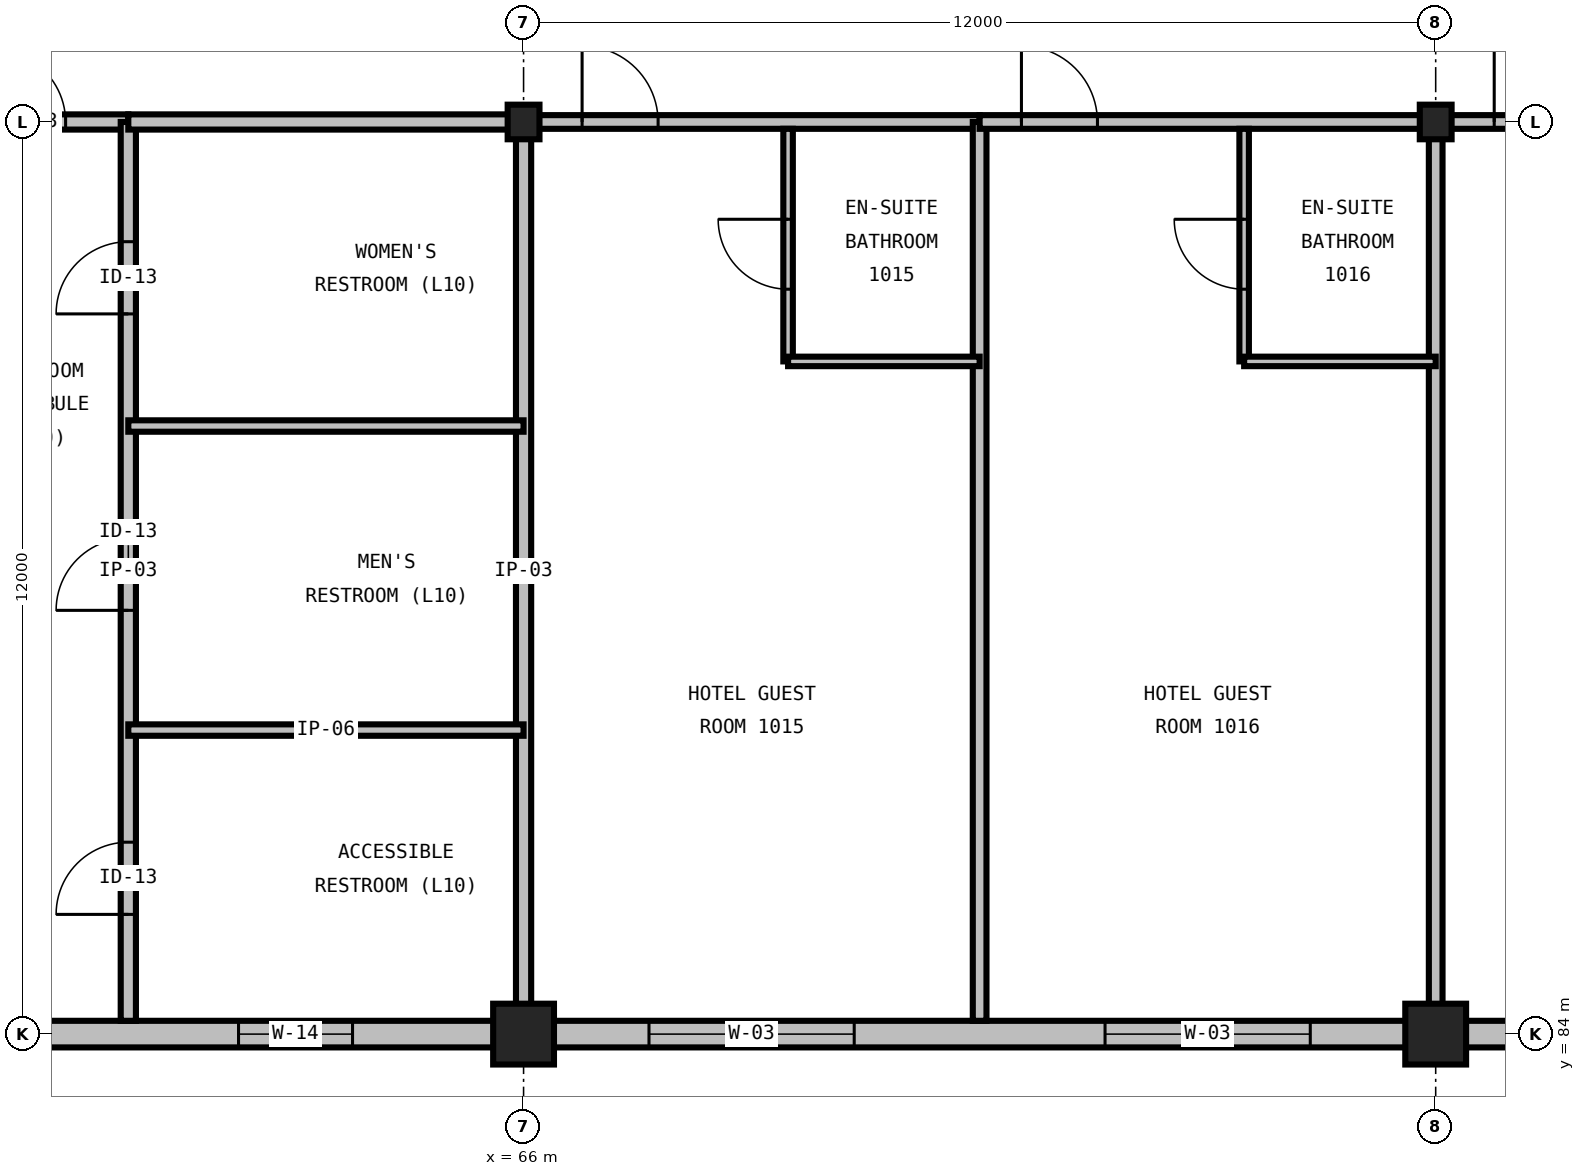
"""IFC4 building model, lengths in metres.
Left out: names, types, materials, properties, quantities, classifications, styles, units other than length and angle.
Written with IfcOpenShell. Run it as: python <this file> out.ifc"""

import sys

from ifc_helpers import new_model, si_unit, direction, frame, frame_2d, origin, origin_2d, place, context, subcontext, project, spatial, rectangle, i_section, extrude, element, fill, save


model = new_model("IFC4")
c1 = context("Model", 3, precision=1e-05, world=origin(), true_north=direction((0.0, 1.0)))
c2 = subcontext(c1, "Body", "Model", "MODEL_VIEW")
j1 = project(units=[si_unit("LENGTHUNIT", "METRE"), si_unit("PLANEANGLEUNIT", "RADIAN")], contexts=[c1])
p1 = place(None, origin())
s1 = spatial("IfcSite", under=j1, at=p1, CompositionType="ELEMENT")
p2 = place(p1, origin())
s2 = spatial("IfcBuilding", under=s1, at=p2, CompositionType="ELEMENT")
p3 = place(p2, frame((0.0, 0.0, 45.6)))
s3 = spatial("IfcBuildingStorey", under=s2, at=p3, CompositionType="ELEMENT", Elevation=45.6)
p4 = place(p3, frame((66.0, 84.0, 0.0), z_axis=(0.0, 0.0, 1.0), x_axis=(1.0, 0.0, 0.0)))
e1 = element("IfcColumn", 1, at=p4, inside=s3, PredefinedType="COLUMN", context=c2, shape_type="SweptSolid", body=[
    extrude(rectangle(XDim=0.8, YDim=0.8, at=origin_2d()), origin(), (0.0, 0.0, 1.0), 3.6),
])
p5 = place(p3, frame((66.0, 96.0, 0.0), z_axis=(0.0, 0.0, 1.0), x_axis=(1.0, 0.0, 0.0)))
e2 = element("IfcColumn", 2, at=p5, inside=s3, PredefinedType="COLUMN", context=c2, shape_type="SweptSolid", body=[
    extrude(i_section(OverallWidth=0.419, OverallDepth=0.455, WebThickness=0.042, FlangeThickness=0.068, FilletRadius=0.031, at=origin_2d()), origin(), (0.0, 0.0, 1.0), 3.6),
])
p6 = place(p3, frame((78.0, 84.0, 0.0), z_axis=(0.0, 0.0, 1.0), x_axis=(1.0, 0.0, 0.0)))
e3 = element("IfcColumn", 3, at=p6, inside=s3, PredefinedType="COLUMN", context=c2, shape_type="SweptSolid", body=[
    extrude(rectangle(XDim=0.8, YDim=0.8, at=origin_2d()), origin(), (0.0, 0.0, 1.0), 3.6),
])
p7 = place(p3, frame((78.0, 96.0, 0.0), z_axis=(0.0, 0.0, 1.0), x_axis=(1.0, 0.0, 0.0)))
e4 = element("IfcColumn", 4, at=p7, inside=s3, PredefinedType="COLUMN", context=c2, shape_type="SweptSolid", body=[
    extrude(i_section(OverallWidth=0.419, OverallDepth=0.455, WebThickness=0.042, FlangeThickness=0.068, FilletRadius=0.031, at=origin_2d()), origin(), (0.0, 0.0, 1.0), 3.6),
])
p8 = place(p3, frame((54.0, 84.0, 0.0), z_axis=(0.0, 0.0, 1.0), x_axis=(1.0, 0.0, 0.0)))
e5 = element("IfcWall", 5, at=p8, inside=s3, PredefinedType="STANDARD", context=c2, shape_type="SweptSolid", body=[
    extrude(rectangle(XDim=12.0, YDim=0.35, at=frame_2d((6.0, 0.0))), origin(), (0.0, 0.0, 1.0), 2.486),
])
p9 = place(p8, frame((2.3, 0.0, 1.0)))
e6 = element("IfcOpeningElement", 6, at=p9, cuts=e5, PredefinedType="OPENING", context=c2, shape_type="SweptSolid", body=[
    extrude(rectangle(XDim=1.4, YDim=1.4, at=frame_2d((0.7, 0.7))), frame((0.0, 0.19, 0.0), z_axis=(0.0, -1.0, 0.0), x_axis=(1.0, 0.0, 0.0)), (0.0, 0.0, 1.0), 0.38),
])
p10 = place(p8, frame((8.25, 0.0, 1.0)))
e7 = element("IfcOpeningElement", 7, at=p10, cuts=e5, PredefinedType="OPENING", context=c2, shape_type="SweptSolid", body=[
    extrude(rectangle(XDim=1.5, YDim=1.35, at=frame_2d((0.75, 0.675))), frame((0.0, 0.19, 0.0), z_axis=(0.0, -1.0, 0.0), x_axis=(1.0, 0.0, 0.0)), (0.0, 0.0, 1.0), 0.38),
])
p11 = place(p3, frame((66.0, 84.0, 0.0), z_axis=(0.0, 0.0, 1.0), x_axis=(1.0, 0.0, 0.0)))
e8 = element("IfcWall", 8, at=p11, inside=s3, PredefinedType="STANDARD", context=c2, shape_type="SweptSolid", body=[
    extrude(rectangle(XDim=12.0, YDim=0.35, at=frame_2d((6.0, 0.0))), origin(), (0.0, 0.0, 1.0), 2.486),
])
p12 = place(p11, frame((1.65, 0.0, 0.72)))
e9 = element("IfcOpeningElement", 9, at=p12, cuts=e8, PredefinedType="OPENING", context=c2, shape_type="SweptSolid", body=[
    extrude(rectangle(XDim=2.7, YDim=1.65, at=frame_2d((1.35, 0.825))), frame((0.0, 0.19, 0.0), z_axis=(0.0, -1.0, 0.0), x_axis=(1.0, 0.0, 0.0)), (0.0, 0.0, 1.0), 0.38),
])
p13 = place(p11, frame((7.65, 0.0, 0.72)))
e10 = element("IfcOpeningElement", 10, at=p13, cuts=e8, PredefinedType="OPENING", context=c2, shape_type="SweptSolid", body=[
    extrude(rectangle(XDim=2.7, YDim=1.65, at=frame_2d((1.35, 0.825))), frame((0.0, 0.19, 0.0), z_axis=(0.0, -1.0, 0.0), x_axis=(1.0, 0.0, 0.0)), (0.0, 0.0, 1.0), 0.38),
])
p14 = place(p3, frame((78.0, 84.0, 0.0), z_axis=(0.0, 0.0, 1.0), x_axis=(1.0, 0.0, 0.0)))
e11 = element("IfcWall", 11, at=p14, inside=s3, PredefinedType="STANDARD", context=c2, shape_type="SweptSolid", body=[
    extrude(rectangle(XDim=6.0, YDim=0.35, at=frame_2d((3.0, 0.0))), origin(), (0.0, 0.0, 1.0), 2.486),
])
p15 = place(p14, frame((1.65, 0.0, 0.72)))
e12 = element("IfcOpeningElement", 12, at=p15, cuts=e11, PredefinedType="OPENING", context=c2, shape_type="SweptSolid", body=[
    extrude(rectangle(XDim=2.7, YDim=1.65, at=frame_2d((1.35, 0.825))), frame((0.0, 0.19, 0.0), z_axis=(0.0, -1.0, 0.0), x_axis=(1.0, 0.0, 0.0)), (0.0, 0.0, 1.0), 0.38),
])
p16 = place(p3, frame((58.4, 96.0, 0.0), z_axis=(0.0, 0.0, 1.0), x_axis=(1.0, 0.0, 0.0)))
e13 = element("IfcWall", 13, at=p16, inside=s3, PredefinedType="PARTITIONING", context=c2, shape_type="SweptSolid", body=[
    extrude(rectangle(XDim=2.4, YDim=0.2, at=frame_2d((1.2, 0.0))), origin(), (0.0, 0.0, 1.0), 2.359),
])
p17 = place(p16, frame((0.625, 0.0, 0.0)))
e14 = element("IfcOpeningElement", 14, at=p17, cuts=e13, PredefinedType="OPENING", context=c2, shape_type="SweptSolid", body=[
    extrude(rectangle(XDim=0.95, YDim=2.15, at=frame_2d((0.475, 1.075))), frame((0.0, 0.115, 0.0), z_axis=(0.0, -1.0, 0.0), x_axis=(1.0, 0.0, 0.0)), (0.0, 0.0, 1.0), 0.23),
])
p18 = place(p3, frame((60.8, 84.175, 0.0), z_axis=(0.0, 0.0, 1.0), x_axis=(0.0, 1.0, 0.0)))
e15 = element("IfcWall", 15, at=p18, inside=s3, PredefinedType="PARTITIONING", context=c2, shape_type="SweptSolid", body=[
    extrude(rectangle(XDim=11.825, YDim=0.2, at=frame_2d((5.913, 0.0))), origin(), (0.0, 0.0, 1.0), 3.29),
])
p19 = place(p18, frame((1.4, 0.0, 0.0)))
e16 = element("IfcOpeningElement", 16, at=p19, cuts=e15, PredefinedType="OPENING", context=c2, shape_type="SweptSolid", body=[
    extrude(rectangle(XDim=0.95, YDim=2.15, at=frame_2d((0.475, 1.075))), frame((0.0, 0.115, 0.0), z_axis=(0.0, -1.0, 0.0), x_axis=(1.0, 0.0, 0.0)), (0.0, 0.0, 1.0), 0.23),
])
p20 = place(p18, frame((5.4, 0.0, 0.0)))
e17 = element("IfcOpeningElement", 17, at=p20, cuts=e15, PredefinedType="OPENING", context=c2, shape_type="SweptSolid", body=[
    extrude(rectangle(XDim=0.95, YDim=2.15, at=frame_2d((0.475, 1.075))), frame((0.0, 0.115, 0.0), z_axis=(0.0, -1.0, 0.0), x_axis=(1.0, 0.0, 0.0)), (0.0, 0.0, 1.0), 0.23),
])
p21 = place(p18, frame((9.3, 0.0, 0.0)))
e18 = element("IfcOpeningElement", 18, at=p21, cuts=e15, PredefinedType="OPENING", context=c2, shape_type="SweptSolid", body=[
    extrude(rectangle(XDim=0.95, YDim=2.15, at=frame_2d((0.475, 1.075))), frame((0.0, 0.115, 0.0), z_axis=(0.0, -1.0, 0.0), x_axis=(1.0, 0.0, 0.0)), (0.0, 0.0, 1.0), 0.23),
])
p22 = place(p3, frame((66.0, 84.175, 0.0), z_axis=(0.0, 0.0, 1.0), x_axis=(0.0, 1.0, 0.0)))
e19 = element("IfcWall", 19, at=p22, inside=s3, PredefinedType="PARTITIONING", context=c2, shape_type="SweptSolid", body=[
    extrude(rectangle(XDim=11.825, YDim=0.2, at=frame_2d((5.913, 0.0))), origin(), (0.0, 0.0, 1.0), 2.59),
])
p23 = place(p3, frame((60.8, 96.0, 0.0), z_axis=(0.0, 0.0, 1.0), x_axis=(1.0, 0.0, 0.0)))
e20 = element("IfcWall", 20, at=p23, inside=s3, PredefinedType="PARTITIONING", context=c2, shape_type="SweptSolid", body=[
    extrude(rectangle(XDim=5.2, YDim=0.2, at=frame_2d((2.6, 0.0))), origin(), (0.0, 0.0, 1.0), 2.359),
])
for number, where, z_axis, x_axis in (
    (21, (60.8, 88.0, 0.0), (0.0, 0.0, 1.0), (1.0, 0.0, 0.0)),
    (22, (60.8, 92.0, 0.0), (0.0, 0.0, 1.0), (1.0, 0.0, 0.0)),
):
    element("IfcWall", number, at=place(p3, frame(where, z_axis=z_axis, x_axis=x_axis)), inside=s3, PredefinedType="PARTITIONING", context=c2, shape_type="SweptSolid", body=[
        extrude(rectangle(XDim=5.2, YDim=0.15, at=frame_2d((2.6, 0.0))), origin(), (0.0, 0.0, 1.0), 3.29),
    ])
p24 = place(p3, frame((66.0, 96.0, 0.0), z_axis=(0.0, 0.0, 1.0), x_axis=(1.0, 0.0, 0.0)))
e23 = element("IfcWall", 23, at=p24, inside=s3, PredefinedType="PARTITIONING", context=c2, shape_type="SweptSolid", body=[
    extrude(rectangle(XDim=6.0, YDim=0.18, at=frame_2d((3.0, 0.0))), origin(), (0.0, 0.0, 1.0), 2.664),
])
p25 = place(p24, frame((0.77, 0.0, 0.0)))
e24 = element("IfcOpeningElement", 24, at=p25, cuts=e23, PredefinedType="OPENING", context=c2, shape_type="SweptSolid", body=[
    extrude(rectangle(XDim=1.0, YDim=2.15, at=frame_2d((0.5, 1.075))), frame((0.0, 0.105, 0.0), z_axis=(0.0, -1.0, 0.0), x_axis=(1.0, 0.0, 0.0)), (0.0, 0.0, 1.0), 0.21),
])
p26 = place(p3, frame((72.0, 84.175, 0.0), z_axis=(0.0, 0.0, 1.0), x_axis=(0.0, 1.0, 0.0)))
e25 = element("IfcWall", 25, at=p26, inside=s3, PredefinedType="PARTITIONING", context=c2, shape_type="SweptSolid", body=[
    extrude(rectangle(XDim=11.825, YDim=0.18, at=frame_2d((5.913, 0.0))), origin(), (0.0, 0.0, 1.0), 3.29),
])
p27 = place(p3, frame((69.48, 92.85, 0.0), z_axis=(0.0, 0.0, 1.0), x_axis=(0.0, 1.0, 0.0)))
e26 = element("IfcWall", 26, at=p27, inside=s3, PredefinedType="PARTITIONING", context=c2, shape_type="SweptSolid", body=[
    extrude(rectangle(XDim=3.06, YDim=0.125, at=frame_2d((1.53, 0.0))), origin(), (0.0, 0.0, 1.0), 3.29),
])
p28 = place(p27, frame((0.95, 0.0, 0.0)))
e27 = element("IfcOpeningElement", 27, at=p28, cuts=e26, PredefinedType="OPENING", context=c2, shape_type="SweptSolid", body=[
    extrude(rectangle(XDim=0.92, YDim=2.1, at=frame_2d((0.46, 1.05))), frame((0.0, 0.077, 0.0), z_axis=(0.0, -1.0, 0.0), x_axis=(1.0, 0.0, 0.0)), (0.0, 0.0, 1.0), 0.155),
])
p29 = place(p3, frame((69.48, 92.85, 0.0), z_axis=(0.0, 0.0, 1.0), x_axis=(1.0, 0.0, 0.0)))
e28 = element("IfcWall", 28, at=p29, inside=s3, PredefinedType="PARTITIONING", context=c2, shape_type="SweptSolid", body=[
    extrude(rectangle(XDim=2.52, YDim=0.125, at=frame_2d((1.26, 0.0))), origin(), (0.0, 0.0, 1.0), 3.29),
])
p30 = place(p3, frame((72.0, 96.0, 0.0), z_axis=(0.0, 0.0, 1.0), x_axis=(1.0, 0.0, 0.0)))
e29 = element("IfcWall", 29, at=p30, inside=s3, PredefinedType="PARTITIONING", context=c2, shape_type="SweptSolid", body=[
    extrude(rectangle(XDim=6.0, YDim=0.18, at=frame_2d((3.0, 0.0))), origin(), (0.0, 0.0, 1.0), 2.664),
])
p31 = place(p30, frame((0.55, 0.0, 0.0)))
e30 = element("IfcOpeningElement", 30, at=p31, cuts=e29, PredefinedType="OPENING", context=c2, shape_type="SweptSolid", body=[
    extrude(rectangle(XDim=1.0, YDim=2.15, at=frame_2d((0.5, 1.075))), frame((0.0, 0.105, 0.0), z_axis=(0.0, -1.0, 0.0), x_axis=(1.0, 0.0, 0.0)), (0.0, 0.0, 1.0), 0.21),
])
p32 = place(p3, frame((78.0, 84.175, 0.0), z_axis=(0.0, 0.0, 1.0), x_axis=(0.0, 1.0, 0.0)))
e31 = element("IfcWall", 31, at=p32, inside=s3, PredefinedType="PARTITIONING", context=c2, shape_type="SweptSolid", body=[
    extrude(rectangle(XDim=11.825, YDim=0.18, at=frame_2d((5.913, 0.0))), origin(), (0.0, 0.0, 1.0), 2.59),
])
p33 = place(p3, frame((75.48, 92.85, 0.0), z_axis=(0.0, 0.0, 1.0), x_axis=(0.0, 1.0, 0.0)))
e32 = element("IfcWall", 32, at=p33, inside=s3, PredefinedType="PARTITIONING", context=c2, shape_type="SweptSolid", body=[
    extrude(rectangle(XDim=3.06, YDim=0.125, at=frame_2d((1.53, 0.0))), origin(), (0.0, 0.0, 1.0), 3.29),
])
p34 = place(p33, frame((0.95, 0.0, 0.0)))
e33 = element("IfcOpeningElement", 33, at=p34, cuts=e32, PredefinedType="OPENING", context=c2, shape_type="SweptSolid", body=[
    extrude(rectangle(XDim=0.92, YDim=2.1, at=frame_2d((0.46, 1.05))), frame((0.0, 0.077, 0.0), z_axis=(0.0, -1.0, 0.0), x_axis=(1.0, 0.0, 0.0)), (0.0, 0.0, 1.0), 0.155),
])
p35 = place(p3, frame((75.48, 92.85, 0.0), z_axis=(0.0, 0.0, 1.0), x_axis=(1.0, 0.0, 0.0)))
e34 = element("IfcWall", 34, at=p35, inside=s3, PredefinedType="PARTITIONING", context=c2, shape_type="SweptSolid", body=[
    extrude(rectangle(XDim=2.52, YDim=0.125, at=frame_2d((1.26, 0.0))), origin(), (0.0, 0.0, 1.0), 3.29),
])
p36 = place(p3, frame((78.0, 96.0, 0.0), z_axis=(0.0, 0.0, 1.0), x_axis=(1.0, 0.0, 0.0)))
e35 = element("IfcWall", 35, at=p36, inside=s3, PredefinedType="PARTITIONING", context=c2, shape_type="SweptSolid", body=[
    extrude(rectangle(XDim=5.915, YDim=0.18, at=frame_2d((2.957, 0.0))), origin(), (0.0, 0.0, 1.0), 2.736),
])
p37 = place(p36, frame((0.77, 0.0, 0.0)))
e36 = element("IfcOpeningElement", 36, at=p37, cuts=e35, PredefinedType="OPENING", context=c2, shape_type="SweptSolid", body=[
    extrude(rectangle(XDim=1.0, YDim=2.15, at=frame_2d((0.5, 1.075))), frame((0.0, 0.105, 0.0), z_axis=(0.0, -1.0, 0.0), x_axis=(1.0, 0.0, 0.0)), (0.0, 0.0, 1.0), 0.21),
])
p38 = place(p10, origin())
e37 = element("IfcWindow", 37, at=p38, inside=s3, PartitioningType="SINGLE_PANEL", PredefinedType="WINDOW", context=c2, shape_type="SweptSolid", body=[
    extrude(rectangle(XDim=1.5, YDim=1.35, at=frame_2d((0.75, 0.675))), frame((0.0, 0.03, 0.0), z_axis=(0.0, -1.0, 0.0), x_axis=(1.0, 0.0, 0.0)), (0.0, 0.0, 1.0), 0.06),
])
fill(e7, e37)
p39 = place(p12, origin())
e38 = element("IfcWindow", 38, at=p39, inside=s3, PartitioningType="TRIPLE_PANEL_VERTICAL", PredefinedType="WINDOW", context=c2, shape_type="SweptSolid", body=[
    extrude(rectangle(XDim=2.7, YDim=1.65, at=frame_2d((1.35, 0.825))), frame((0.0, 0.03, 0.0), z_axis=(0.0, -1.0, 0.0), x_axis=(1.0, 0.0, 0.0)), (0.0, 0.0, 1.0), 0.06),
])
fill(e9, e38)
p40 = place(p13, origin())
e39 = element("IfcWindow", 39, at=p40, inside=s3, PartitioningType="TRIPLE_PANEL_VERTICAL", PredefinedType="WINDOW", context=c2, shape_type="SweptSolid", body=[
    extrude(rectangle(XDim=2.7, YDim=1.65, at=frame_2d((1.35, 0.825))), frame((0.0, 0.03, 0.0), z_axis=(0.0, -1.0, 0.0), x_axis=(1.0, 0.0, 0.0)), (0.0, 0.0, 1.0), 0.06),
])
fill(e10, e39)
p41 = place(p17, origin())
e40 = element("IfcDoor", 40, at=p41, inside=s3, OperationType="SINGLE_SWING_LEFT", PredefinedType="DOOR", context=c2, shape_type="SweptSolid", body=[
    extrude(rectangle(XDim=0.95, YDim=2.15, at=frame_2d((0.475, 1.075))), frame((0.0, 0.025, 0.0), z_axis=(0.0, -1.0, 0.0), x_axis=(1.0, 0.0, 0.0)), (0.0, 0.0, 1.0), 0.05),
])
fill(e14, e40)
p42 = place(p19, origin())
e41 = element("IfcDoor", 41, at=p42, inside=s3, OperationType="SINGLE_SWING_LEFT", PredefinedType="DOOR", context=c2, shape_type="SweptSolid", body=[
    extrude(rectangle(XDim=0.95, YDim=2.15, at=frame_2d((0.475, 1.075))), frame((0.0, 0.025, 0.0), z_axis=(0.0, -1.0, 0.0), x_axis=(1.0, 0.0, 0.0)), (0.0, 0.0, 1.0), 0.05),
])
fill(e16, e41)
p43 = place(p20, origin())
e42 = element("IfcDoor", 42, at=p43, inside=s3, OperationType="SINGLE_SWING_LEFT", PredefinedType="DOOR", context=c2, shape_type="SweptSolid", body=[
    extrude(rectangle(XDim=0.95, YDim=2.15, at=frame_2d((0.475, 1.075))), frame((0.0, 0.025, 0.0), z_axis=(0.0, -1.0, 0.0), x_axis=(1.0, 0.0, 0.0)), (0.0, 0.0, 1.0), 0.05),
])
fill(e17, e42)
p44 = place(p21, origin())
e43 = element("IfcDoor", 43, at=p44, inside=s3, OperationType="SINGLE_SWING_LEFT", PredefinedType="DOOR", context=c2, shape_type="SweptSolid", body=[
    extrude(rectangle(XDim=0.95, YDim=2.15, at=frame_2d((0.475, 1.075))), frame((0.0, 0.025, 0.0), z_axis=(0.0, -1.0, 0.0), x_axis=(1.0, 0.0, 0.0)), (0.0, 0.0, 1.0), 0.05),
])
fill(e18, e43)
p45 = place(p25, origin())
e44 = element("IfcDoor", 44, at=p45, inside=s3, OperationType="SINGLE_SWING_LEFT", PredefinedType="DOOR", context=c2, shape_type="SweptSolid", body=[
    extrude(rectangle(XDim=1.0, YDim=2.15, at=frame_2d((0.5, 1.075))), frame((0.0, 0.025, 0.0), z_axis=(0.0, -1.0, 0.0), x_axis=(1.0, 0.0, 0.0)), (0.0, 0.0, 1.0), 0.05),
])
fill(e24, e44)
p46 = place(p28, origin())
e45 = element("IfcDoor", 45, at=p46, inside=s3, OperationType="SINGLE_SWING_RIGHT", PredefinedType="DOOR", context=c2, shape_type="SweptSolid", body=[
    extrude(rectangle(XDim=0.92, YDim=2.1, at=frame_2d((0.46, 1.05))), frame((0.0, 0.025, 0.0), z_axis=(0.0, -1.0, 0.0), x_axis=(1.0, 0.0, 0.0)), (0.0, 0.0, 1.0), 0.05),
])
fill(e27, e45)
p47 = place(p31, origin())
e46 = element("IfcDoor", 46, at=p47, inside=s3, OperationType="SINGLE_SWING_LEFT", PredefinedType="DOOR", context=c2, shape_type="SweptSolid", body=[
    extrude(rectangle(XDim=1.0, YDim=2.15, at=frame_2d((0.5, 1.075))), frame((0.0, 0.025, 0.0), z_axis=(0.0, -1.0, 0.0), x_axis=(1.0, 0.0, 0.0)), (0.0, 0.0, 1.0), 0.05),
])
fill(e30, e46)
p48 = place(p34, origin())
e47 = element("IfcDoor", 47, at=p48, inside=s3, OperationType="SINGLE_SWING_RIGHT", PredefinedType="DOOR", context=c2, shape_type="SweptSolid", body=[
    extrude(rectangle(XDim=0.92, YDim=2.1, at=frame_2d((0.46, 1.05))), frame((0.0, 0.025, 0.0), z_axis=(0.0, -1.0, 0.0), x_axis=(1.0, 0.0, 0.0)), (0.0, 0.0, 1.0), 0.05),
])
fill(e33, e47)
p49 = place(p37, origin())
e48 = element("IfcDoor", 48, at=p49, inside=s3, OperationType="SINGLE_SWING_LEFT", PredefinedType="DOOR", context=c2, shape_type="SweptSolid", body=[
    extrude(rectangle(XDim=1.0, YDim=2.15, at=frame_2d((0.5, 1.075))), frame((0.0, 0.025, 0.0), z_axis=(0.0, -1.0, 0.0), x_axis=(1.0, 0.0, 0.0)), (0.0, 0.0, 1.0), 0.05),
])
fill(e36, e48)
save(model, sys.argv[1])
